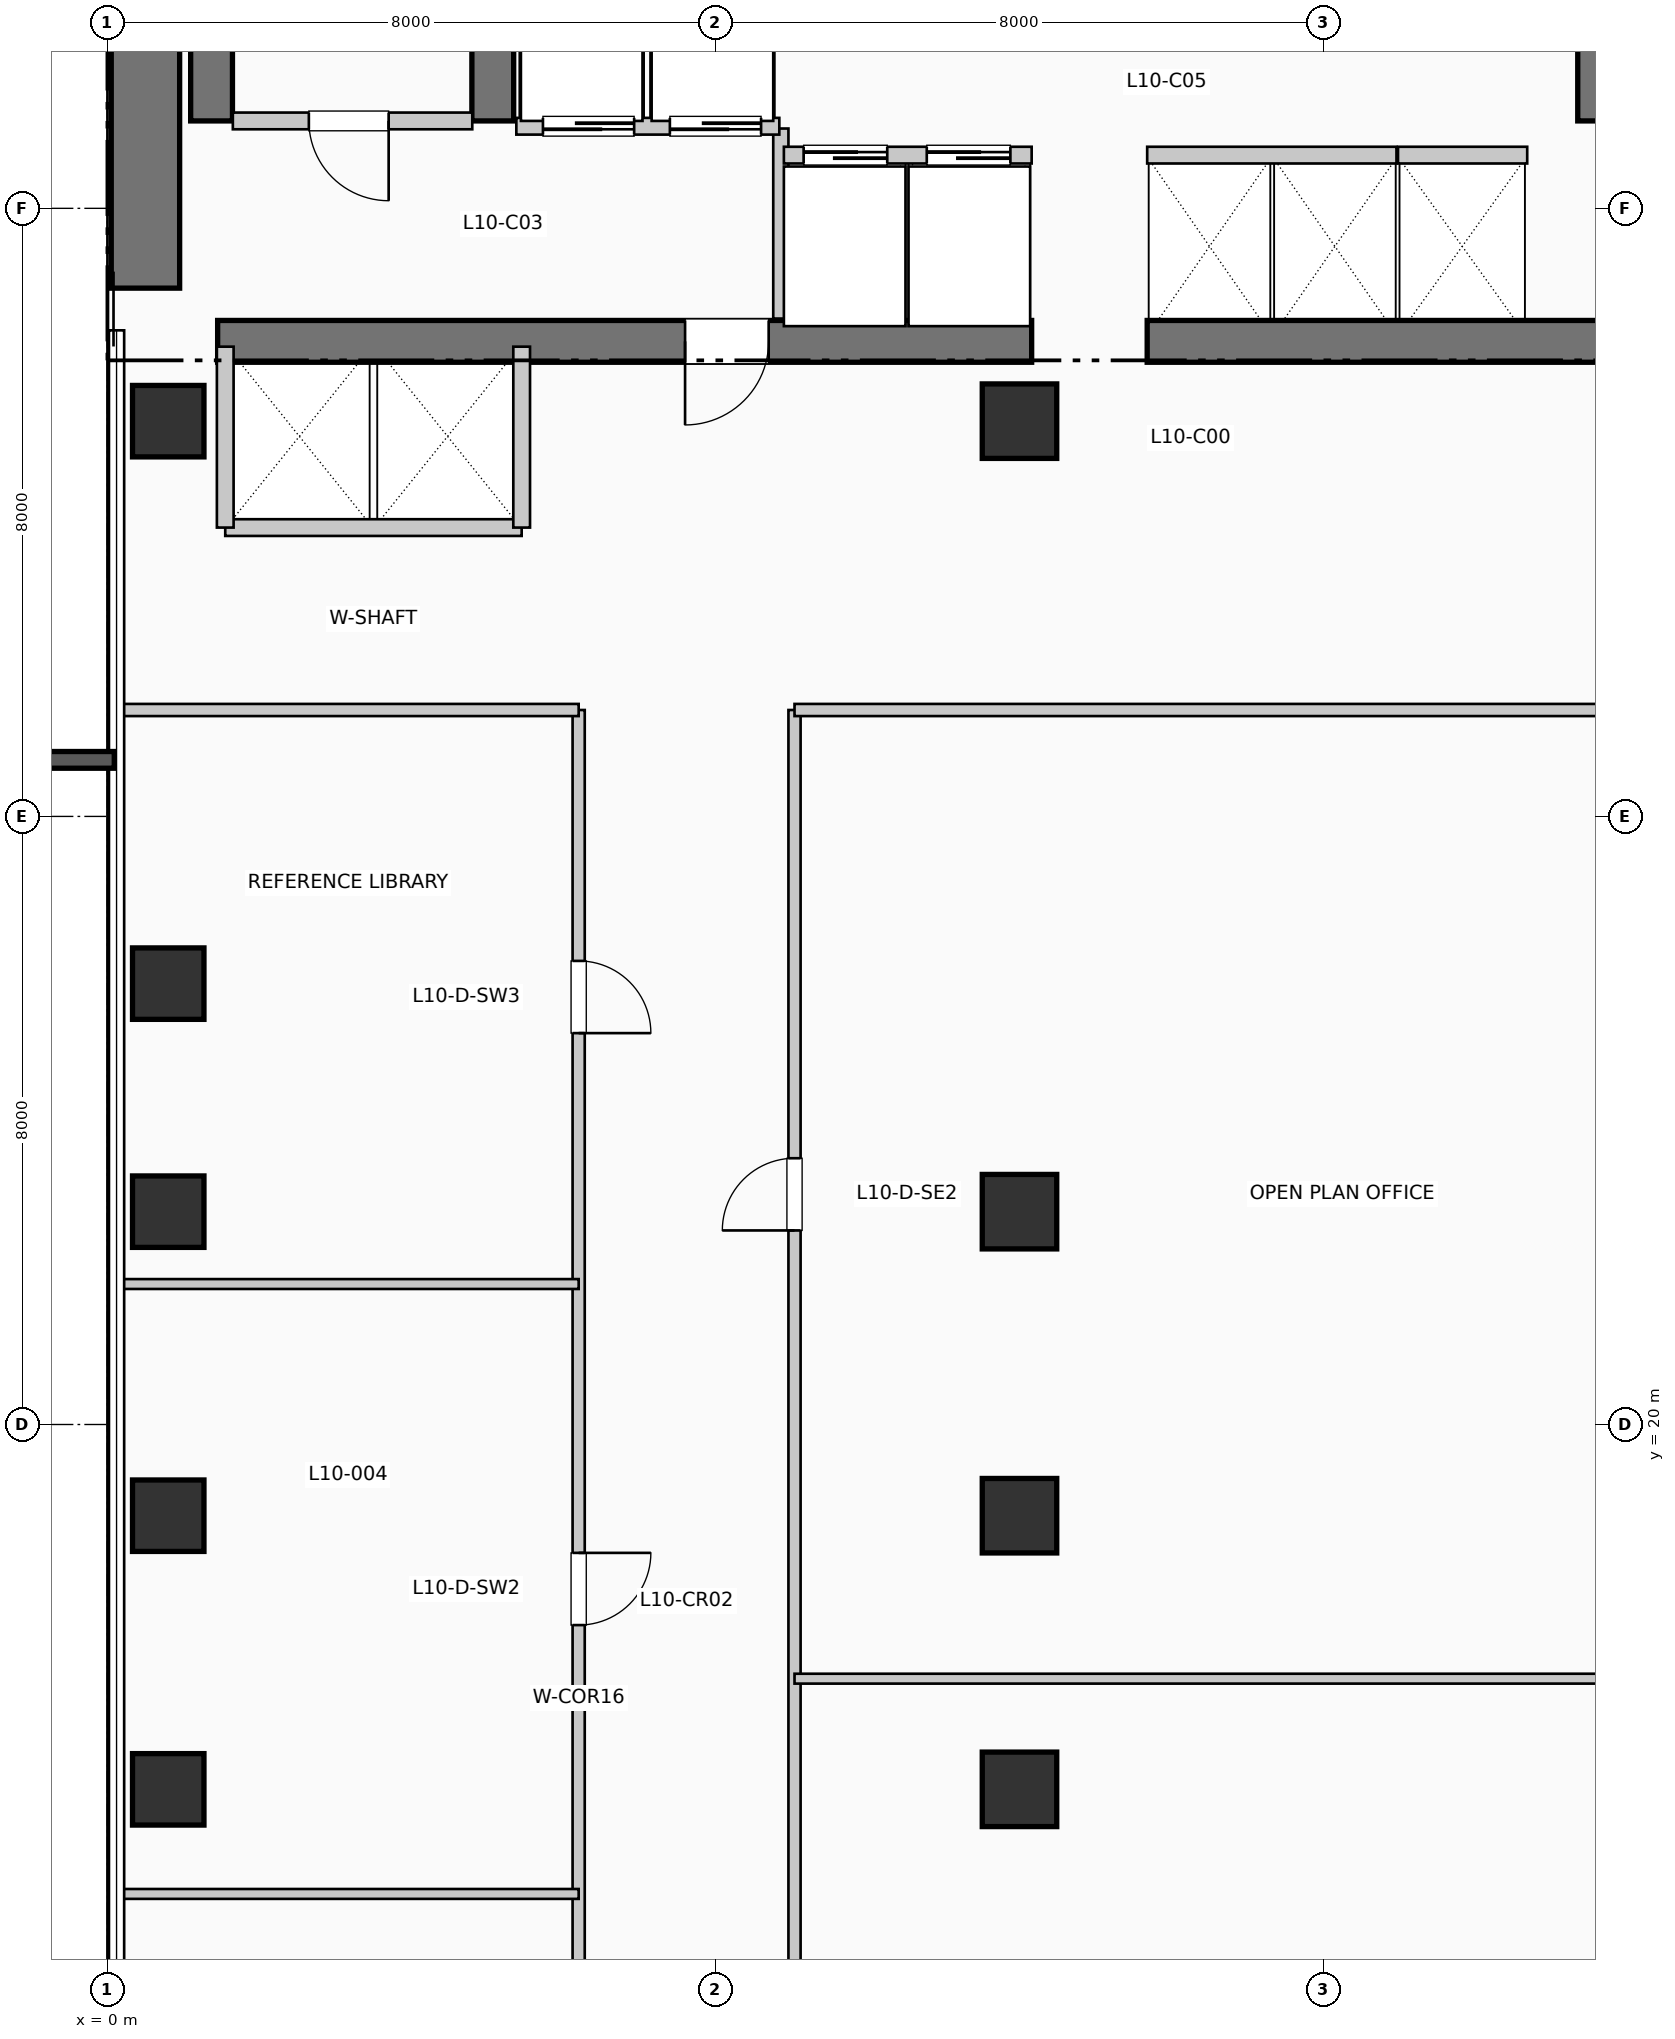
"""IFC4 building model, lengths in metres.
Left out: names, types, materials, properties, quantities, classifications, styles, units other than length and angle.
Written with IfcOpenShell. Run it as: python <this file> out.ifc"""

import sys

from ifc_helpers import new_model, si_unit, direction, frame, frame_2d, origin, origin_2d, place, context, subcontext, project, spatial, rectangle, extrude, element, fill, save


model = new_model("IFC4")
c1 = context("Model", 3, precision=1e-05, world=origin(), true_north=direction((0.0, 1.0)))
c2 = subcontext(c1, "Body", "Model", "MODEL_VIEW")
j1 = project(units=[si_unit("LENGTHUNIT", "METRE"), si_unit("PLANEANGLEUNIT", "RADIAN")], contexts=[c1])
p1 = place(None, origin())
s1 = spatial("IfcSite", under=j1, at=p1, CompositionType="ELEMENT")
p2 = place(p1, origin())
s2 = spatial("IfcBuilding", under=s1, at=p2, CompositionType="ELEMENT")
p3 = place(p2, frame((0.0, 0.0, 46.2)))
s3 = spatial("IfcBuildingStorey", under=s2, at=p3, CompositionType="ELEMENT", Elevation=46.2)
p4 = place(p3, frame((0.5, 34.95, 0.0), z_axis=(0.0, 0.0, 1.0), x_axis=(0.0, 1.0, 0.0)))
e1 = element("IfcWall", 1, at=p4, inside=s3, PredefinedType="SHEAR", context=c2, shape_type="SweptSolid", body=[
    extrude(rectangle(XDim=7.9, YDim=0.9, at=frame_2d((3.95, 0.0))), origin(), (0.0, 0.0, 1.0), 3.96),
])
p5 = place(p3, frame((1.45, 34.25, 0.0), z_axis=(0.0, 0.0, 1.0), x_axis=(1.0, 0.0, 0.0)))
e2 = element("IfcWall", 2, at=p5, inside=s3, PredefinedType="SHEAR", context=c2, shape_type="SweptSolid", body=[
    extrude(rectangle(XDim=10.71, YDim=0.55, at=frame_2d((5.355, 0.0))), origin(), (0.0, 0.0, 1.0), 3.96),
])
p6 = place(p5, frame((7.25, 0.0, 0.0), z_axis=(0.0, 0.0, 1.0), x_axis=(-1.0, 0.0, 0.0)))
e3 = element("IfcOpeningElement", 3, at=p6, cuts=e2, PredefinedType="OPENING", context=c2, shape_type="SweptSolid", body=[
    extrude(rectangle(XDim=1.1, YDim=2.15, at=frame_2d((0.55, 1.075))), frame((0.0, 0.285, 0.0), z_axis=(0.0, -1.0, 0.0), x_axis=(1.0, 0.0, 0.0)), (0.0, 0.0, 1.0), 0.57),
])
p7 = place(p3, frame((13.68, 34.25, 0.0), z_axis=(0.0, 0.0, 1.0), x_axis=(1.0, 0.0, 0.0)))
e4 = element("IfcWall", 4, at=p7, inside=s3, PredefinedType="SHEAR", context=c2, shape_type="SweptSolid", body=[
    extrude(rectangle(XDim=6.12, YDim=0.55, at=frame_2d((3.06, 0.0))), origin(), (0.0, 0.0, 1.0), 3.96),
])
for number, where, z_axis, x_axis in (
    (5, (1.37, 37.15, 0.0), (0.0, 0.0, 1.0), (0.0, 1.0, 0.0)),
    (6, (5.07, 37.15, 0.0), (0.0, 0.0, 1.0), (0.0, 1.0, 0.0)),
    (7, (19.62, 37.15, 0.0), (0.0, 0.0, 1.0), (0.0, 1.0, 0.0)),
):
    element("IfcWall", number, at=place(p3, frame(where, z_axis=z_axis, x_axis=x_axis)), inside=s3, PredefinedType="SHEAR", context=c2, shape_type="SweptSolid", body=[
        extrude(rectangle(XDim=7.89, YDim=0.55, at=frame_2d((3.945, 0.0))), origin(), (0.0, 0.0, 1.0), 3.96),
    ])
for number, where, z_axis, x_axis in (
    (8, (0.8, 15.2, 0.0), (0.0, 0.0, 1.0), (1.0, 0.0, 0.0)),
    (9, (0.8, 18.8, 0.0), (0.0, 0.0, 1.0), (1.0, 0.0, 0.0)),
    (10, (0.8, 22.8, 0.0), (0.0, 0.0, 1.0), (1.0, 0.0, 0.0)),
    (11, (0.8, 25.8, 0.0), (0.0, 0.0, 1.0), (1.0, 0.0, 0.0)),
    (12, (0.8, 33.2, 0.0), (0.0, 0.0, 1.0), (1.0, 0.0, 0.0)),
):
    element("IfcColumn", number, at=place(p3, frame(where, z_axis=z_axis, x_axis=x_axis)), inside=s3, PredefinedType="COLUMN", context=c2, shape_type="SweptSolid", body=[
        extrude(rectangle(XDim=0.94, YDim=0.94, at=origin_2d()), origin(), (0.0, 0.0, 1.0), 3.96),
    ])
for number, where, z_axis, x_axis in (
    (13, (12.0, 15.2, 0.0), (0.0, 0.0, 1.0), (1.0, 0.0, 0.0)),
    (14, (12.0, 18.8, 0.0), (0.0, 0.0, 1.0), (1.0, 0.0, 0.0)),
    (15, (12.0, 22.8, 0.0), (0.0, 0.0, 1.0), (1.0, 0.0, 0.0)),
    (16, (12.0, 33.2, 0.0), (0.0, 0.0, 1.0), (1.0, 0.0, 0.0)),
):
    element("IfcColumn", number, at=place(p3, frame(where, z_axis=z_axis, x_axis=x_axis)), inside=s3, PredefinedType="COLUMN", context=c2, shape_type="SweptSolid", body=[
        extrude(rectangle(XDim=0.98, YDim=0.98, at=origin_2d()), origin(), (0.0, 0.0, 1.0), 3.96),
    ])
p8 = place(p3, frame((1.65, 37.15, 0.0), z_axis=(0.0, 0.0, 1.0), x_axis=(1.0, 0.0, 0.0)))
e17 = element("IfcWall", 17, at=p8, inside=s3, PredefinedType="PARTITIONING", context=c2, shape_type="SweptSolid", body=[
    extrude(rectangle(XDim=3.15, YDim=0.22, at=frame_2d((1.575, 0.0))), origin(), (0.0, 0.0, 1.0), 3.71),
])
p9 = place(p8, frame((2.05, 0.0, 0.0), z_axis=(0.0, 0.0, 1.0), x_axis=(-1.0, 0.0, 0.0)))
e18 = element("IfcOpeningElement", 18, at=p9, cuts=e17, PredefinedType="OPENING", context=c2, shape_type="SweptSolid", body=[
    extrude(rectangle(XDim=1.05, YDim=2.15, at=frame_2d((0.525, 1.075))), frame((0.0, 0.12, 0.0), z_axis=(0.0, -1.0, 0.0), x_axis=(1.0, 0.0, 0.0)), (0.0, 0.0, 1.0), 0.24),
])
p10 = place(p3, frame((8.86, 34.55, 0.0), z_axis=(0.0, 0.0, 1.0), x_axis=(0.0, 1.0, 0.0)))
e19 = element("IfcWall", 19, at=p10, inside=s3, PredefinedType="PARTITIONING", context=c2, shape_type="SweptSolid", body=[
    extrude(rectangle(XDim=2.5, YDim=0.2, at=frame_2d((1.25, 0.0))), origin(), (0.0, 0.0, 1.0), 3.71),
])
p11 = place(p3, frame((5.38, 37.08, 0.0), z_axis=(0.0, 0.0, 1.0), x_axis=(1.0, 0.0, 0.0)))
e20 = element("IfcWall", 20, at=p11, inside=s3, PredefinedType="PARTITIONING", context=c2, shape_type="SweptSolid", body=[
    extrude(rectangle(XDim=3.46, YDim=0.22, at=frame_2d((1.73, 0.0))), origin(), (0.0, 0.0, 1.0), 3.71),
])
p12 = place(p11, frame((1.55, 0.0, 0.0), z_axis=(0.0, 0.0, 1.0), x_axis=(-1.0, 0.0, 0.0)))
e21 = element("IfcOpeningElement", 21, at=p12, cuts=e20, PredefinedType="OPENING", context=c2, shape_type="SweptSolid", body=[
    extrude(rectangle(XDim=1.2, YDim=2.2, at=frame_2d((0.6, 1.1))), frame((0.0, 0.12, 0.0), z_axis=(0.0, -1.0, 0.0), x_axis=(1.0, 0.0, 0.0)), (0.0, 0.0, 1.0), 0.24),
])
p13 = place(p11, frame((3.22, 0.0, 0.0), z_axis=(0.0, 0.0, 1.0), x_axis=(-1.0, 0.0, 0.0)))
e22 = element("IfcOpeningElement", 22, at=p13, cuts=e20, PredefinedType="OPENING", context=c2, shape_type="SweptSolid", body=[
    extrude(rectangle(XDim=1.2, YDim=2.2, at=frame_2d((0.6, 1.1))), frame((0.0, 0.12, 0.0), z_axis=(0.0, -1.0, 0.0), x_axis=(1.0, 0.0, 0.0)), (0.0, 0.0, 1.0), 0.24),
])
p14 = place(p3, frame((1.55, 31.8, 0.0), z_axis=(0.0, 0.0, 1.0), x_axis=(1.0, 0.0, 0.0)))
e23 = element("IfcWall", 23, at=p14, inside=s3, PredefinedType="PARTITIONING", context=c2, shape_type="SweptSolid", body=[
    extrude(rectangle(XDim=3.9, YDim=0.22, at=frame_2d((1.95, 0.0))), origin(), (0.0, 0.0, 1.0), 3.71),
])
for number, where, z_axis, x_axis in (
    (24, (1.55, 31.8, 0.0), (0.0, 0.0, 1.0), (0.0, 1.0, 0.0)),
    (25, (5.45, 31.8, 0.0), (0.0, 0.0, 1.0), (0.0, 1.0, 0.0)),
):
    element("IfcWall", number, at=place(p3, frame(where, z_axis=z_axis, x_axis=x_axis)), inside=s3, PredefinedType="PARTITIONING", context=c2, shape_type="SweptSolid", body=[
        extrude(rectangle(XDim=2.38, YDim=0.22, at=frame_2d((1.19, 0.0))), origin(), (0.0, 0.0, 1.0), 3.71),
    ])
p15 = place(p3, frame((8.9, 36.7, 0.0), z_axis=(0.0, 0.0, 1.0), x_axis=(1.0, 0.0, 0.0)))
e26 = element("IfcWall", 26, at=p15, inside=s3, PredefinedType="PARTITIONING", context=c2, shape_type="SweptSolid", body=[
    extrude(rectangle(XDim=3.26, YDim=0.22, at=frame_2d((1.63, 0.0))), origin(), (0.0, 0.0, 1.0), 3.71),
])
p16 = place(p15, frame((0.26, 0.0, 0.0)))
e27 = element("IfcOpeningElement", 27, at=p16, cuts=e26, PredefinedType="OPENING", context=c2, shape_type="SweptSolid", body=[
    extrude(rectangle(XDim=1.1, YDim=2.2, at=frame_2d((0.55, 1.1))), frame((0.0, 0.12, 0.0), z_axis=(0.0, -1.0, 0.0), x_axis=(1.0, 0.0, 0.0)), (0.0, 0.0, 1.0), 0.24),
])
p17 = place(p15, frame((1.88, 0.0, 0.0)))
e28 = element("IfcOpeningElement", 28, at=p17, cuts=e26, PredefinedType="OPENING", context=c2, shape_type="SweptSolid", body=[
    extrude(rectangle(XDim=1.1, YDim=2.2, at=frame_2d((0.55, 1.1))), frame((0.0, 0.12, 0.0), z_axis=(0.0, -1.0, 0.0), x_axis=(1.0, 0.0, 0.0)), (0.0, 0.0, 1.0), 0.24),
])
p18 = place(p3, frame((13.68, 36.7, 0.0), z_axis=(0.0, 0.0, 1.0), x_axis=(1.0, 0.0, 0.0)))
e29 = element("IfcWall", 29, at=p18, inside=s3, PredefinedType="PARTITIONING", context=c2, shape_type="SweptSolid", body=[
    extrude(rectangle(XDim=3.28, YDim=0.22, at=frame_2d((1.64, 0.0))), origin(), (0.0, 0.0, 1.0), 3.71),
])
p19 = place(p3, frame((16.98, 36.7, 0.0), z_axis=(0.0, 0.0, 1.0), x_axis=(1.0, 0.0, 0.0)))
e30 = element("IfcWall", 30, at=p19, inside=s3, PredefinedType="PARTITIONING", context=c2, shape_type="SweptSolid", body=[
    extrude(rectangle(XDim=1.7, YDim=0.22, at=frame_2d((0.85, 0.0))), origin(), (0.0, 0.0, 1.0), 3.71),
])
p20 = place(p3, frame((6.2, 5.8, 0.0), z_axis=(0.0, 0.0, 1.0), x_axis=(0.0, 1.0, 0.0)))
e31 = element("IfcWall", 31, at=p20, inside=s3, PredefinedType="PARTITIONING", context=c2, shape_type="SweptSolid", body=[
    extrude(rectangle(XDim=23.6, YDim=0.16, at=frame_2d((11.8, 0.0))), origin(), (0.0, 0.0, 1.0), 3.71),
])
p21 = place(p20, frame((4.487, 0.0, 0.0), z_axis=(0.0, 0.0, 1.0), x_axis=(-1.0, 0.0, 0.0)))
e32 = element("IfcOpeningElement", 32, at=p21, cuts=e31, PredefinedType="OPENING", context=c2, shape_type="SweptSolid", body=[
    extrude(rectangle(XDim=0.95, YDim=2.15, at=frame_2d((0.475, 1.075))), frame((0.0, 0.09, 0.0), z_axis=(0.0, -1.0, 0.0), x_axis=(1.0, 0.0, 0.0)), (0.0, 0.0, 1.0), 0.18),
])
p22 = place(p20, frame((12.511, 0.0, 0.0), z_axis=(0.0, 0.0, 1.0), x_axis=(-1.0, 0.0, 0.0)))
e33 = element("IfcOpeningElement", 33, at=p22, cuts=e31, PredefinedType="OPENING", context=c2, shape_type="SweptSolid", body=[
    extrude(rectangle(XDim=0.95, YDim=2.15, at=frame_2d((0.475, 1.075))), frame((0.0, 0.09, 0.0), z_axis=(0.0, -1.0, 0.0), x_axis=(1.0, 0.0, 0.0)), (0.0, 0.0, 1.0), 0.18),
])
p23 = place(p20, frame((20.299, 0.0, 0.0), z_axis=(0.0, 0.0, 1.0), x_axis=(-1.0, 0.0, 0.0)))
e34 = element("IfcOpeningElement", 34, at=p23, cuts=e31, PredefinedType="OPENING", context=c2, shape_type="SweptSolid", body=[
    extrude(rectangle(XDim=0.95, YDim=2.15, at=frame_2d((0.475, 1.075))), frame((0.0, 0.09, 0.0), z_axis=(0.0, -1.0, 0.0), x_axis=(1.0, 0.0, 0.0)), (0.0, 0.0, 1.0), 0.18),
])
p24 = place(p3, frame((9.04, 5.8, 0.0), z_axis=(0.0, 0.0, 1.0), x_axis=(0.0, 1.0, 0.0)))
e35 = element("IfcWall", 35, at=p24, inside=s3, PredefinedType="PARTITIONING", context=c2, shape_type="SweptSolid", body=[
    extrude(rectangle(XDim=23.6, YDim=0.16, at=frame_2d((11.8, 0.0))), origin(), (0.0, 0.0, 1.0), 3.71),
])
p25 = place(p24, frame((4.953, 0.0, 0.0)))
e36 = element("IfcOpeningElement", 36, at=p25, cuts=e35, PredefinedType="OPENING", context=c2, shape_type="SweptSolid", body=[
    extrude(rectangle(XDim=0.95, YDim=2.15, at=frame_2d((0.475, 1.075))), frame((0.0, 0.09, 0.0), z_axis=(0.0, -1.0, 0.0), x_axis=(1.0, 0.0, 0.0)), (0.0, 0.0, 1.0), 0.18),
])
p26 = place(p24, frame((16.753, 0.0, 0.0)))
e37 = element("IfcOpeningElement", 37, at=p26, cuts=e35, PredefinedType="OPENING", context=c2, shape_type="SweptSolid", body=[
    extrude(rectangle(XDim=0.95, YDim=2.15, at=frame_2d((0.475, 1.075))), frame((0.0, 0.09, 0.0), z_axis=(0.0, -1.0, 0.0), x_axis=(1.0, 0.0, 0.0)), (0.0, 0.0, 1.0), 0.18),
])
p27 = place(p3, frame((0.19, 29.4, 0.0), z_axis=(0.0, 0.0, 1.0), x_axis=(1.0, 0.0, 0.0)))
e38 = element("IfcWall", 38, at=p27, inside=s3, PredefinedType="PARTITIONING", context=c2, shape_type="SweptSolid", body=[
    extrude(rectangle(XDim=6.01, YDim=0.16, at=frame_2d((3.005, 0.0))), origin(), (0.0, 0.0, 1.0), 3.365),
])
p28 = place(p3, frame((9.04, 29.4, 0.0), z_axis=(0.0, 0.0, 1.0), x_axis=(1.0, 0.0, 0.0)))
e39 = element("IfcWall", 39, at=p28, inside=s3, PredefinedType="PARTITIONING", context=c2, shape_type="SweptSolid", body=[
    extrude(rectangle(XDim=14.41, YDim=0.16, at=frame_2d((7.205, 0.0))), origin(), (0.0, 0.0, 1.0), 3.365),
])
for number, where, z_axis, x_axis in (
    (40, (0.19, 13.824, 0.0), (0.0, 0.0, 1.0), (1.0, 0.0, 0.0)),
    (41, (0.19, 21.848, 0.0), (0.0, 0.0, 1.0), (1.0, 0.0, 0.0)),
):
    element("IfcWall", number, at=place(p3, frame(where, z_axis=z_axis, x_axis=x_axis)), inside=s3, PredefinedType="PARTITIONING", context=c2, shape_type="SweptSolid", body=[
        extrude(rectangle(XDim=6.01, YDim=0.13, at=frame_2d((3.005, 0.0))), origin(), (0.0, 0.0, 1.0), 3.71),
    ])
p29 = place(p3, frame((9.04, 16.656, 0.0), z_axis=(0.0, 0.0, 1.0), x_axis=(1.0, 0.0, 0.0)))
e42 = element("IfcWall", 42, at=p29, inside=s3, PredefinedType="PARTITIONING", context=c2, shape_type="SweptSolid", body=[
    extrude(rectangle(XDim=14.41, YDim=0.13, at=frame_2d((7.205, 0.0))), origin(), (0.0, 0.0, 1.0), 3.71),
])
p30 = place(p9, origin())
e43 = element("IfcDoor", 43, at=p30, inside=s3, OperationType="SINGLE_SWING_RIGHT", PredefinedType="DOOR", context=c2, shape_type="SweptSolid", body=[
    extrude(rectangle(XDim=1.05, YDim=2.15, at=frame_2d((0.525, 1.075))), frame((0.0, 0.025, 0.0), z_axis=(0.0, -1.0, 0.0), x_axis=(1.0, 0.0, 0.0)), (0.0, 0.0, 1.0), 0.05),
])
fill(e18, e43)
p31 = place(p6, origin())
e44 = element("IfcDoor", 44, at=p31, inside=s3, OperationType="SINGLE_SWING_LEFT", PredefinedType="DOOR", context=c2, shape_type="SweptSolid", body=[
    extrude(rectangle(XDim=1.1, YDim=2.15, at=frame_2d((0.55, 1.075))), frame((0.0, 0.025, 0.0), z_axis=(0.0, -1.0, 0.0), x_axis=(1.0, 0.0, 0.0)), (0.0, 0.0, 1.0), 0.05),
])
fill(e3, e44)
p32 = place(p12, origin())
e45 = element("IfcDoor", 45, at=p32, inside=s3, OperationType="SLIDING_TO_RIGHT", PredefinedType="DOOR", context=c2, shape_type="SweptSolid", body=[
    extrude(rectangle(XDim=1.2, YDim=2.2, at=frame_2d((0.6, 1.1))), frame((0.0, 0.025, 0.0), z_axis=(0.0, -1.0, 0.0), x_axis=(1.0, 0.0, 0.0)), (0.0, 0.0, 1.0), 0.05),
])
fill(e21, e45)
p33 = place(p13, origin())
e46 = element("IfcDoor", 46, at=p33, inside=s3, OperationType="SLIDING_TO_RIGHT", PredefinedType="DOOR", context=c2, shape_type="SweptSolid", body=[
    extrude(rectangle(XDim=1.2, YDim=2.2, at=frame_2d((0.6, 1.1))), frame((0.0, 0.025, 0.0), z_axis=(0.0, -1.0, 0.0), x_axis=(1.0, 0.0, 0.0)), (0.0, 0.0, 1.0), 0.05),
])
fill(e22, e46)
p34 = place(p16, origin())
e47 = element("IfcDoor", 47, at=p34, inside=s3, OperationType="SLIDING_TO_LEFT", PredefinedType="DOOR", context=c2, shape_type="SweptSolid", body=[
    extrude(rectangle(XDim=1.1, YDim=2.2, at=frame_2d((0.55, 1.1))), frame((0.0, 0.025, 0.0), z_axis=(0.0, -1.0, 0.0), x_axis=(1.0, 0.0, 0.0)), (0.0, 0.0, 1.0), 0.05),
])
fill(e27, e47)
p35 = place(p17, origin())
e48 = element("IfcDoor", 48, at=p35, inside=s3, OperationType="SLIDING_TO_LEFT", PredefinedType="DOOR", context=c2, shape_type="SweptSolid", body=[
    extrude(rectangle(XDim=1.1, YDim=2.2, at=frame_2d((0.55, 1.1))), frame((0.0, 0.025, 0.0), z_axis=(0.0, -1.0, 0.0), x_axis=(1.0, 0.0, 0.0)), (0.0, 0.0, 1.0), 0.05),
])
fill(e28, e48)
p36 = place(p22, origin())
e49 = element("IfcDoor", 49, at=p36, inside=s3, OperationType="SINGLE_SWING_RIGHT", PredefinedType="DOOR", context=c2, shape_type="SweptSolid", body=[
    extrude(rectangle(XDim=0.95, YDim=2.15, at=frame_2d((0.475, 1.075))), frame((0.0, 0.025, 0.0), z_axis=(0.0, -1.0, 0.0), x_axis=(1.0, 0.0, 0.0)), (0.0, 0.0, 1.0), 0.05),
])
fill(e33, e49)
p37 = place(p23, origin())
e50 = element("IfcDoor", 50, at=p37, inside=s3, OperationType="SINGLE_SWING_LEFT", PredefinedType="DOOR", context=c2, shape_type="SweptSolid", body=[
    extrude(rectangle(XDim=0.95, YDim=2.15, at=frame_2d((0.475, 1.075))), frame((0.0, 0.025, 0.0), z_axis=(0.0, -1.0, 0.0), x_axis=(1.0, 0.0, 0.0)), (0.0, 0.0, 1.0), 0.05),
])
fill(e34, e50)
p38 = place(p26, origin())
e51 = element("IfcDoor", 51, at=p38, inside=s3, OperationType="SINGLE_SWING_LEFT", PredefinedType="DOOR", context=c2, shape_type="SweptSolid", body=[
    extrude(rectangle(XDim=0.95, YDim=2.15, at=frame_2d((0.475, 1.075))), frame((0.0, 0.025, 0.0), z_axis=(0.0, -1.0, 0.0), x_axis=(1.0, 0.0, 0.0)), (0.0, 0.0, 1.0), 0.05),
])
fill(e37, e51)
save(model, sys.argv[1])
